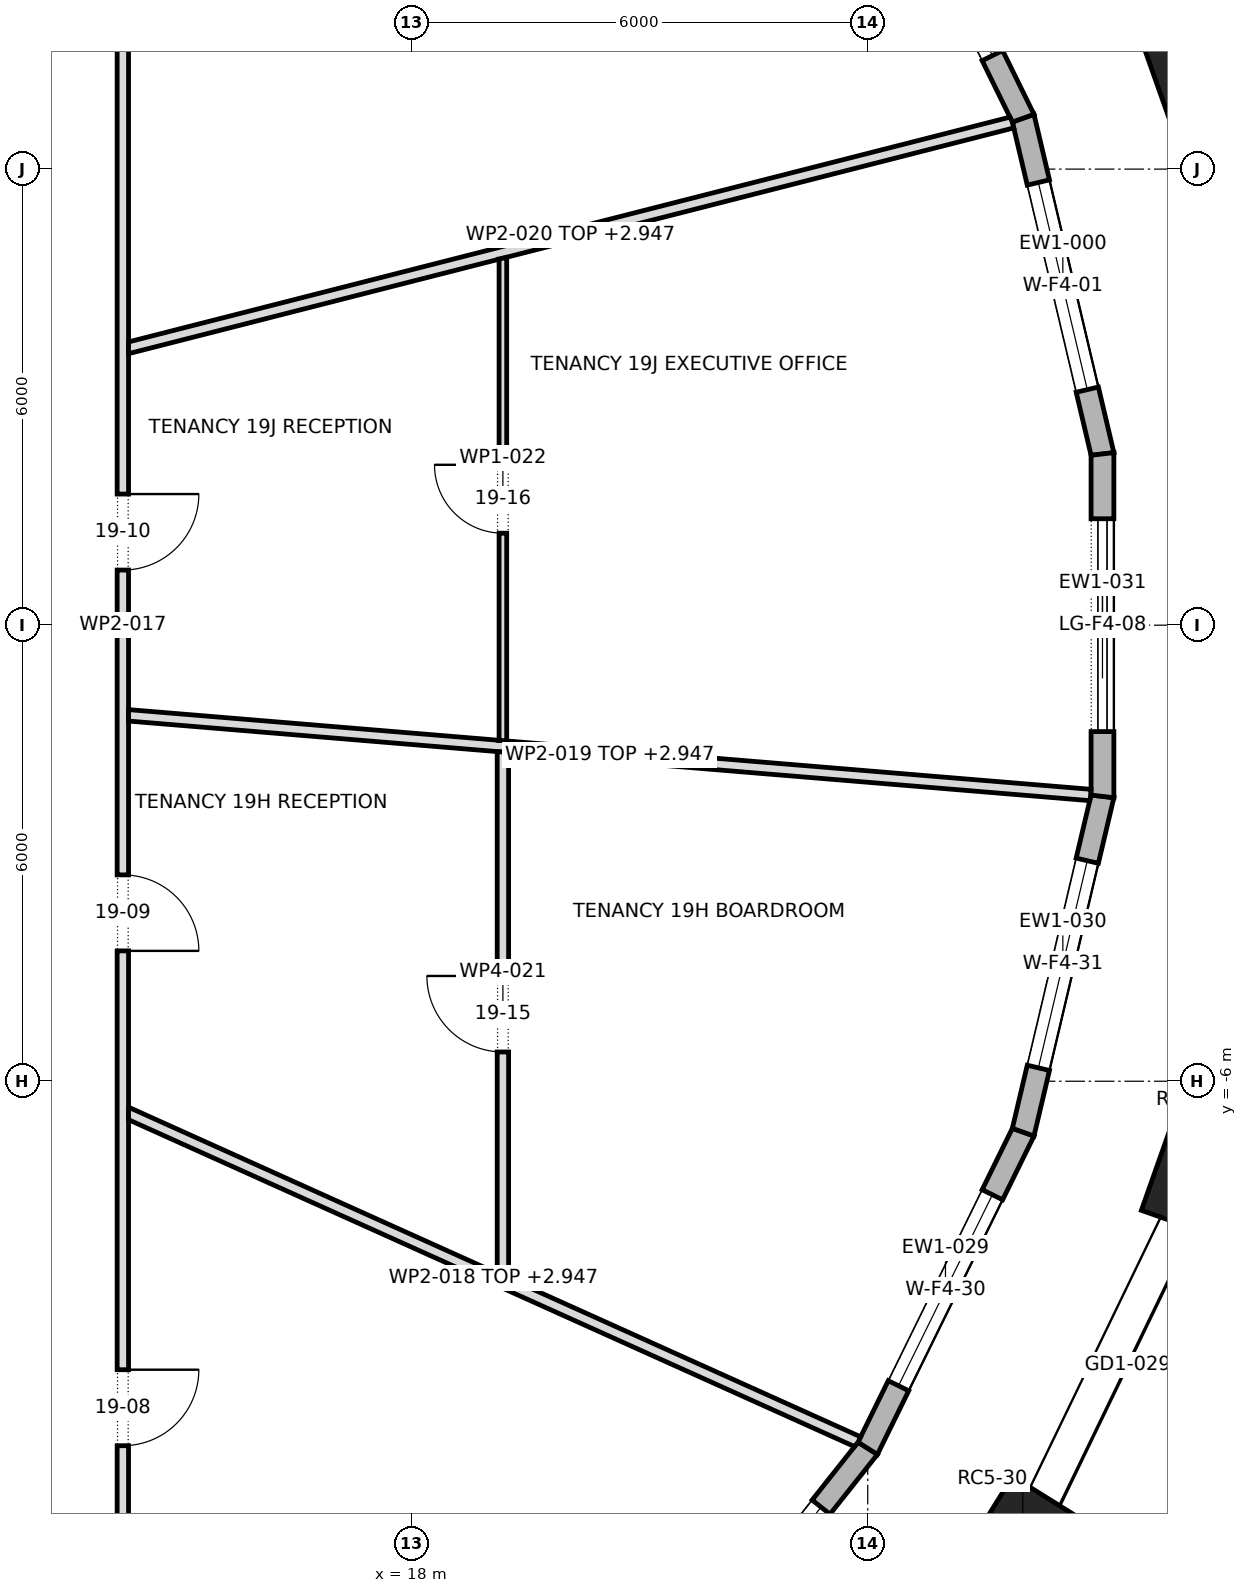
"""IFC4 building model, lengths in metres.
Left out: names, types, materials, properties, quantities, classifications, styles, units other than length and angle.
Written with IfcOpenShell. Run it as: python <this file> out.ifc"""

import sys

from ifc_helpers import new_model, si_unit, direction, frame, frame_2d, origin, origin_2d, place, context, subcontext, project, spatial, polyline, rectangle, outline, extrude, element, fill, save


model = new_model("IFC4")
c1 = context("Model", 3, precision=1e-05, world=origin(), true_north=direction((0.0, 1.0)))
c2 = subcontext(c1, "Body", "Model", "MODEL_VIEW")
j1 = project(units=[si_unit("LENGTHUNIT", "METRE"), si_unit("PLANEANGLEUNIT", "RADIAN")], contexts=[c1])
p1 = place(None, origin())
s1 = spatial("IfcSite", under=j1, at=p1, CompositionType="ELEMENT")
p2 = place(p1, origin())
s2 = spatial("IfcBuilding", under=s1, at=p2, CompositionType="ELEMENT")
p3 = place(p2, frame((0.0, 0.0, 276.3)))
s3 = spatial("IfcBuildingStorey", under=s2, at=p3, CompositionType="ELEMENT", Elevation=276.3)
for number, where, z_axis, x_axis in (
    (1, (28.255, 7.347, 0.0), (0.0, 0.0, 1.0), (-0.334, 0.943, 0.0)),
    (2, (26.04, -11.93, 0.0), (0.0, 0.0, 1.0), (0.529, 0.849, 0.0)),
    (3, (28.255, -7.347, 0.0), (0.0, 0.0, 1.0), (0.334, 0.943, 0.0)),
):
    element("IfcColumn", number, at=place(p3, frame(where, z_axis=z_axis, x_axis=x_axis)), inside=s3, PredefinedType="COLUMN", context=c2, shape_type="SweptSolid", body=[
        extrude(rectangle(XDim=1.1, YDim=1.0, at=origin_2d()), origin(), (0.0, 0.0, 1.0), 4.0),
    ])
p4 = place(p3, frame((27.088, 2.252, 0.0), z_axis=(0.0, 0.0, 1.0), x_axis=(-0.22983372436, 0.973229910734, 0.0)))
e4 = element("IfcWall", 4, at=p4, inside=s3, PredefinedType="STANDARD", context=c2, shape_type="SweptSolid", body=[
    extrude(outline(polyline([(-0.018, -0.15), (4.556, -0.15), (4.522, 0.15), (0.018, 0.15), (-0.018, -0.15)])), origin(), (0.0, 0.0, 1.0), 3.7),
])
p5 = place(p4, frame((0.869, 0.0, 0.6)))
e5 = element("IfcOpeningElement", 5, at=p5, cuts=e4, PredefinedType="OPENING", context=c2, shape_type="SweptSolid", body=[
    extrude(rectangle(XDim=2.8, YDim=2.65, at=frame_2d((1.4, 1.325))), frame((0.0, 0.162, 0.0), z_axis=(0.0, -1.0, 0.0), x_axis=(1.0, 0.0, 0.0)), (0.0, 0.0, 1.0), 0.324),
])
p6 = place(p3, frame((26.045, 6.67, 0.0), z_axis=(0.0, 0.0, 1.0), x_axis=(-0.441261940724, 0.897378348117, 0.0)))
e6 = element("IfcWall", 6, at=p6, inside=s3, PredefinedType="STANDARD", context=c2, shape_type="SweptSolid", body=[
    extrude(outline(polyline([(-0.017, -0.15), (4.651, -0.15), (4.619, 0.15), (0.017, 0.15), (-0.017, -0.15)])), origin(), (0.0, 0.0, 1.0), 3.7),
])
p7 = place(p6, frame((0.917, 0.0, 0.6)))
e7 = element("IfcOpeningElement", 7, at=p7, cuts=e6, PredefinedType="OPENING", context=c2, shape_type="SweptSolid", body=[
    extrude(rectangle(XDim=2.8, YDim=2.65, at=frame_2d((1.4, 1.325))), frame((0.0, 0.162, 0.0), z_axis=(0.0, -1.0, 0.0), x_axis=(1.0, 0.0, 0.0)), (0.0, 0.0, 1.0), 0.324),
])
p8 = place(p3, frame((21.032, -14.57, 0.0), z_axis=(0.0, 0.0, 1.0), x_axis=(0.621434755851, 0.783465917715, 0.0)))
e8 = element("IfcWall", 8, at=p8, inside=s3, PredefinedType="STANDARD", context=c2, shape_type="SweptSolid", body=[
    extrude(outline(polyline([(-0.015, -0.15), (4.791, -0.15), (4.759, 0.15), (0.015, 0.15), (-0.015, -0.15)])), origin(), (0.0, 0.0, 1.0), 3.7),
])
p9 = place(p8, frame((0.987, 0.0, 0.6)))
e9 = element("IfcOpeningElement", 9, at=p9, cuts=e8, PredefinedType="OPENING", context=c2, shape_type="SweptSolid", body=[
    extrude(rectangle(XDim=2.8, YDim=2.65, at=frame_2d((1.4, 1.325))), frame((0.0, 0.162, 0.0), z_axis=(0.0, -1.0, 0.0), x_axis=(1.0, 0.0, 0.0)), (0.0, 0.0, 1.0), 0.324),
])
p10 = place(p3, frame((24.0, -10.829, 0.0), z_axis=(0.0, 0.0, 1.0), x_axis=(0.441261940724, 0.897378348117, 0.0)))
e10 = element("IfcWall", 10, at=p10, inside=s3, PredefinedType="STANDARD", context=c2, shape_type="SweptSolid", body=[
    extrude(outline(polyline([(-0.016, -0.15), (4.652, -0.15), (4.618, 0.15), (0.016, 0.15), (-0.016, -0.15)])), origin(), (0.0, 0.0, 1.0), 3.7),
])
p11 = place(p10, frame((0.917, 0.0, 0.6)))
e11 = element("IfcOpeningElement", 11, at=p11, cuts=e10, PredefinedType="OPENING", context=c2, shape_type="SweptSolid", body=[
    extrude(rectangle(XDim=2.8, YDim=2.65, at=frame_2d((1.4, 1.325))), frame((0.0, 0.162, 0.0), z_axis=(0.0, -1.0, 0.0), x_axis=(1.0, 0.0, 0.0)), (0.0, 0.0, 1.0), 0.324),
])
p12 = place(p3, frame((26.045, -6.67, 0.0), z_axis=(0.0, 0.0, 1.0), x_axis=(0.22983372436, 0.973229910734, 0.0)))
e12 = element("IfcWall", 12, at=p12, inside=s3, PredefinedType="STANDARD", context=c2, shape_type="SweptSolid", body=[
    extrude(outline(polyline([(-0.017, -0.15), (4.557, -0.15), (4.521, 0.15), (0.017, 0.15), (-0.017, -0.15)])), origin(), (0.0, 0.0, 1.0), 3.7),
])
p13 = place(p12, frame((0.869, 0.0, 0.6)))
e13 = element("IfcOpeningElement", 13, at=p13, cuts=e12, PredefinedType="OPENING", context=c2, shape_type="SweptSolid", body=[
    extrude(rectangle(XDim=2.8, YDim=2.65, at=frame_2d((1.4, 1.325))), frame((0.0, 0.162, 0.0), z_axis=(0.0, -1.0, 0.0), x_axis=(1.0, 0.0, 0.0)), (0.0, 0.0, 1.0), 0.324),
])
p14 = place(p3, frame((27.088, -2.252, 0.0), z_axis=(0.0, 0.0, 1.0), x_axis=(0.0, 1.0, 0.0)))
e14 = element("IfcWall", 14, at=p14, inside=s3, PredefinedType="STANDARD", context=c2, shape_type="SweptSolid", body=[
    extrude(outline(polyline([(-0.018, -0.15), (4.522, -0.15), (4.487, 0.15), (0.018, 0.15), (-0.018, -0.15)])), origin(), (0.0, 0.0, 1.0), 3.7),
])
p15 = place(p14, frame((0.852, 0.0, 0.0)))
e15 = element("IfcOpeningElement", 15, at=p15, cuts=e14, PredefinedType="OPENING", context=c2, shape_type="SweptSolid", body=[
    extrude(rectangle(XDim=2.8, YDim=3.25, at=frame_2d((1.4, 1.625))), frame((0.0, 0.162, 0.0), z_axis=(0.0, -1.0, 0.0), x_axis=(1.0, 0.0, 0.0)), (0.0, 0.0, 1.0), 0.324),
])
p16 = place(p3, frame((14.2, -14.275, 0.0), z_axis=(0.0, 0.0, 1.0), x_axis=(0.0, 1.0, 0.0)))
e16 = element("IfcWall", 16, at=p16, inside=s3, PredefinedType="PARTITIONING", context=c2, shape_type="SweptSolid", body=[
    extrude(outline(polyline([(28.55, -0.075), (28.55, -0.075), (28.4, 0.075), (26.517, 0.075), (24.633, 0.075), (22.75, 0.075), (20.866, 0.075), (18.983, 0.075), (17.1, 0.075), (15.217, 0.075), (13.333, 0.075), (11.45, 0.075), (9.567, 0.075), (7.683, 0.075), (5.8, 0.075), (3.917, 0.075), (2.033, 0.075), (0.15, 0.075), (0.0, -0.075), (1.903, -0.075), (3.807, -0.075), (5.71, -0.075), (7.613, -0.075), (9.517, -0.075), (11.42, -0.075), (13.323, -0.075), (15.227, -0.075), (17.13, -0.075), (19.033, -0.075), (20.937, -0.075), (22.84, -0.075), (24.743, -0.075), (26.646, -0.075), (28.55, -0.075)])), origin(), (0.0, 0.0, 1.0), 3.7),
])
p17 = place(p16, frame((3.48, 0.0, 0.0)))
e17 = element("IfcOpeningElement", 17, at=p17, cuts=e16, PredefinedType="OPENING", context=c2, shape_type="SweptSolid", body=[
    extrude(rectangle(XDim=1.0, YDim=2.1, at=frame_2d((0.5, 1.05))), frame((0.0, 0.087, 0.0), z_axis=(0.0, -1.0, 0.0), x_axis=(1.0, 0.0, 0.0)), (0.0, 0.0, 1.0), 0.174),
])
p18 = place(p16, frame((9.99, 0.0, 0.0)))
e18 = element("IfcOpeningElement", 18, at=p18, cuts=e16, PredefinedType="OPENING", context=c2, shape_type="SweptSolid", body=[
    extrude(rectangle(XDim=1.0, YDim=2.1, at=frame_2d((0.5, 1.05))), frame((0.0, 0.087, 0.0), z_axis=(0.0, -1.0, 0.0), x_axis=(1.0, 0.0, 0.0)), (0.0, 0.0, 1.0), 0.174),
])
p19 = place(p16, frame((15.0, 0.0, 0.0)))
e19 = element("IfcOpeningElement", 19, at=p19, cuts=e16, PredefinedType="OPENING", context=c2, shape_type="SweptSolid", body=[
    extrude(rectangle(XDim=1.0, YDim=2.1, at=frame_2d((0.5, 1.05))), frame((0.0, 0.087, 0.0), z_axis=(0.0, -1.0, 0.0), x_axis=(1.0, 0.0, 0.0)), (0.0, 0.0, 1.0), 0.174),
])
p20 = place(p16, frame((22.69, 0.0, 0.0)))
e20 = element("IfcOpeningElement", 20, at=p20, cuts=e16, PredefinedType="OPENING", context=c2, shape_type="SweptSolid", body=[
    extrude(rectangle(XDim=1.0, YDim=2.1, at=frame_2d((0.5, 1.05))), frame((0.0, 0.087, 0.0), z_axis=(0.0, -1.0, 0.0), x_axis=(1.0, 0.0, 0.0)), (0.0, 0.0, 1.0), 0.174),
])
p21 = place(p3, frame((14.245, -6.41, 0.0), z_axis=(0.0, 0.0, 1.0), x_axis=(0.91183931518, -0.410547272908, 0.0)))
e21 = element("IfcWall", 21, at=p21, inside=s3, PredefinedType="PARTITIONING", context=c2, shape_type="SweptSolid", body=[
    extrude(outline(polyline([(0.067, -0.075), (1.813, -0.075), (3.559, -0.075), (5.304, -0.075), (7.05, -0.075), (8.796, -0.075), (10.542, -0.075), (10.56, -0.003), (10.562, 0.073), (10.562, 0.075), (8.816, 0.075), (7.07, 0.075), (5.324, 0.075), (5.319, 0.073), (5.318, 0.075), (3.546, 0.075), (1.773, 0.075), (0.0, 0.075), (0.0, 0.074), (0.067, -0.075)])), origin(), (0.0, 0.0, 1.0), 2.947),
])
p22 = place(p3, frame((14.269, -1.186, 0.0), z_axis=(0.0, 0.0, 1.0), x_axis=(0.996588692452, -0.082528650035, 0.0)))
e22 = element("IfcWall", 22, at=p22, inside=s3, PredefinedType="PARTITIONING", context=c2, shape_type="SweptSolid", body=[
    extrude(outline(polyline([(0.012, -0.075), (1.682, -0.075), (3.353, -0.075), (5.023, -0.075), (5.029, -0.074), (5.029, -0.075), (6.947, -0.075), (8.865, -0.075), (10.783, -0.075), (12.701, -0.075), (12.706, -0.042), (12.706, 0.075), (10.753, 0.075), (8.8, 0.075), (6.847, 0.075), (4.894, 0.075), (4.891, 0.075), (4.891, 0.075), (3.261, 0.075), (1.63, 0.075), (0.0, 0.075), (0.0, 0.069), (0.012, -0.075)])), origin(), (0.0, 0.0, 1.0), 2.947),
])
p23 = place(p3, frame((14.257, 3.645, 0.0), z_axis=(0.0, 0.0, 1.0), x_axis=(0.968990601513, 0.247097580277, 0.0)))
e23 = element("IfcWall", 23, at=p23, inside=s3, PredefinedType="PARTITIONING", context=c2, shape_type="SweptSolid", body=[
    extrude(outline(polyline([(12.019, -0.075), (12.019, 0.011), (12.005, 0.075), (10.011, 0.075), (8.016, 0.075), (6.022, 0.075), (4.027, 0.075), (2.033, 0.075), (0.038, 0.075), (0.0, -0.074), (0.0, -0.075), (1.717, -0.075), (3.434, -0.075), (5.151, -0.075), (6.868, -0.075), (8.585, -0.075), (10.302, -0.075), (12.019, -0.075)])), origin(), (0.0, 0.0, 1.0), 2.947),
])
p24 = place(p3, frame((19.2, -1.664, 0.0), z_axis=(0.0, 0.0, 1.0), x_axis=(0.0, -1.0, 0.0)))
e24 = element("IfcWall", 24, at=p24, inside=s3, PredefinedType="PARTITIONING", context=c2, shape_type="SweptSolid", body=[
    extrude(outline(polyline([(0.0, -0.075), (1.715, -0.075), (3.431, -0.075), (5.146, -0.075), (6.862, -0.075), (6.929, 0.074), (6.929, 0.075), (5.2, 0.075), (3.47, 0.075), (1.741, 0.075), (0.012, 0.075), (0.0, -0.07), (0.0, -0.075)])), origin(), (0.0, 0.0, 1.0), 3.7),
])
p25 = place(p24, frame((2.951, 0.0, 0.0)))
e25 = element("IfcOpeningElement", 25, at=p25, cuts=e24, PredefinedType="OPENING", context=c2, shape_type="SweptSolid", body=[
    extrude(rectangle(XDim=1.0, YDim=2.1, at=frame_2d((0.5, 1.05))), frame((0.0, 0.087, 0.0), z_axis=(0.0, -1.0, 0.0), x_axis=(1.0, 0.0, 0.0)), (0.0, 0.0, 1.0), 0.174),
])
p26 = place(p3, frame((19.2, 4.84, 0.0), z_axis=(0.0, 0.0, 1.0), x_axis=(0.0, -1.0, 0.0)))
e26 = element("IfcWall", 26, at=p26, inside=s3, PredefinedType="PARTITIONING", context=c2, shape_type="SweptSolid", body=[
    extrude(outline(polyline([(0.025, -0.05), (1.607, -0.05), (3.19, -0.05), (4.772, -0.05), (6.355, -0.05), (6.363, 0.045), (6.363, 0.05), (4.772, 0.05), (3.181, 0.05), (1.591, 0.05), (0.0, 0.05), (0.0, 0.049), (0.025, -0.05)])), origin(), (0.0, 0.0, 1.0), 3.7),
])
p27 = place(p26, frame((2.73, 0.0, 0.0)))
e27 = element("IfcOpeningElement", 27, at=p27, cuts=e26, PredefinedType="OPENING", context=c2, shape_type="SweptSolid", body=[
    extrude(rectangle(XDim=0.9, YDim=2.1, at=frame_2d((0.45, 1.05))), frame((0.0, 0.062, 0.0), z_axis=(0.0, -1.0, 0.0), x_axis=(1.0, 0.0, 0.0)), (0.0, 0.0, 1.0), 0.124),
])
p28 = place(p5, origin())
e28 = element("IfcWindow", 28, at=p28, inside=s3, PartitioningType="DOUBLE_PANEL_VERTICAL", PredefinedType="WINDOW", context=c2, shape_type="SweptSolid", body=[
    extrude(rectangle(XDim=2.8, YDim=2.65, at=frame_2d((1.4, 1.325))), frame((0.0, 0.03, 0.0), z_axis=(0.0, -1.0, 0.0), x_axis=(1.0, 0.0, 0.0)), (0.0, 0.0, 1.0), 0.06),
])
fill(e5, e28)
p29 = place(p7, origin())
e29 = element("IfcWindow", 29, at=p29, inside=s3, PartitioningType="DOUBLE_PANEL_VERTICAL", PredefinedType="WINDOW", context=c2, shape_type="SweptSolid", body=[
    extrude(rectangle(XDim=2.8, YDim=2.65, at=frame_2d((1.4, 1.325))), frame((0.0, 0.03, 0.0), z_axis=(0.0, -1.0, 0.0), x_axis=(1.0, 0.0, 0.0)), (0.0, 0.0, 1.0), 0.06),
])
fill(e7, e29)
p30 = place(p9, origin())
e30 = element("IfcWindow", 30, at=p30, inside=s3, PartitioningType="DOUBLE_PANEL_VERTICAL", PredefinedType="WINDOW", context=c2, shape_type="SweptSolid", body=[
    extrude(rectangle(XDim=2.8, YDim=2.65, at=frame_2d((1.4, 1.325))), frame((0.0, 0.03, 0.0), z_axis=(0.0, -1.0, 0.0), x_axis=(1.0, 0.0, 0.0)), (0.0, 0.0, 1.0), 0.06),
])
fill(e9, e30)
p31 = place(p11, origin())
e31 = element("IfcWindow", 31, at=p31, inside=s3, PartitioningType="DOUBLE_PANEL_VERTICAL", PredefinedType="WINDOW", context=c2, shape_type="SweptSolid", body=[
    extrude(rectangle(XDim=2.8, YDim=2.65, at=frame_2d((1.4, 1.325))), frame((0.0, 0.03, 0.0), z_axis=(0.0, -1.0, 0.0), x_axis=(1.0, 0.0, 0.0)), (0.0, 0.0, 1.0), 0.06),
])
fill(e11, e31)
p32 = place(p13, origin())
e32 = element("IfcWindow", 32, at=p32, inside=s3, PartitioningType="DOUBLE_PANEL_VERTICAL", PredefinedType="WINDOW", context=c2, shape_type="SweptSolid", body=[
    extrude(rectangle(XDim=2.8, YDim=2.65, at=frame_2d((1.4, 1.325))), frame((0.0, 0.03, 0.0), z_axis=(0.0, -1.0, 0.0), x_axis=(1.0, 0.0, 0.0)), (0.0, 0.0, 1.0), 0.06),
])
fill(e13, e32)
p33 = place(p15, origin())
e33 = element("IfcDoor", 33, at=p33, inside=s3, OperationType="DOUBLE_DOOR_SLIDING", PredefinedType="DOOR", context=c2, shape_type="SweptSolid", body=[
    extrude(rectangle(XDim=2.8, YDim=3.25, at=frame_2d((1.4, 1.625))), frame((0.0, 0.025, 0.0), z_axis=(0.0, -1.0, 0.0), x_axis=(1.0, 0.0, 0.0)), (0.0, 0.0, 1.0), 0.05),
])
fill(e15, e33)
p34 = place(p17, frame((1.0, 0.0, 0.0), z_axis=(0.0, 0.0, 1.0), x_axis=(-1.0, 0.0, 0.0)))
e34 = element("IfcDoor", 34, at=p34, inside=s3, OperationType="SINGLE_SWING_RIGHT", PredefinedType="DOOR", context=c2, shape_type="SweptSolid", body=[
    extrude(rectangle(XDim=1.0, YDim=2.1, at=frame_2d((0.5, 1.05))), frame((0.0, 0.025, 0.0), z_axis=(0.0, -1.0, 0.0), x_axis=(1.0, 0.0, 0.0)), (0.0, 0.0, 1.0), 0.05),
])
fill(e17, e34)
p35 = place(p18, frame((1.0, 0.0, 0.0), z_axis=(0.0, 0.0, 1.0), x_axis=(-1.0, 0.0, 0.0)))
e35 = element("IfcDoor", 35, at=p35, inside=s3, OperationType="SINGLE_SWING_LEFT", PredefinedType="DOOR", context=c2, shape_type="SweptSolid", body=[
    extrude(rectangle(XDim=1.0, YDim=2.1, at=frame_2d((0.5, 1.05))), frame((0.0, 0.025, 0.0), z_axis=(0.0, -1.0, 0.0), x_axis=(1.0, 0.0, 0.0)), (0.0, 0.0, 1.0), 0.05),
])
fill(e18, e35)
p36 = place(p19, frame((1.0, 0.0, 0.0), z_axis=(0.0, 0.0, 1.0), x_axis=(-1.0, 0.0, 0.0)))
e36 = element("IfcDoor", 36, at=p36, inside=s3, OperationType="SINGLE_SWING_RIGHT", PredefinedType="DOOR", context=c2, shape_type="SweptSolid", body=[
    extrude(rectangle(XDim=1.0, YDim=2.1, at=frame_2d((0.5, 1.05))), frame((0.0, 0.025, 0.0), z_axis=(0.0, -1.0, 0.0), x_axis=(1.0, 0.0, 0.0)), (0.0, 0.0, 1.0), 0.05),
])
fill(e19, e36)
p37 = place(p25, frame((1.0, 0.0, 0.0), z_axis=(0.0, 0.0, 1.0), x_axis=(-1.0, 0.0, 0.0)))
e37 = element("IfcDoor", 37, at=p37, inside=s3, OperationType="SINGLE_SWING_LEFT", PredefinedType="DOOR", context=c2, shape_type="SweptSolid", body=[
    extrude(rectangle(XDim=1.0, YDim=2.1, at=frame_2d((0.5, 1.05))), frame((0.0, 0.025, 0.0), z_axis=(0.0, -1.0, 0.0), x_axis=(1.0, 0.0, 0.0)), (0.0, 0.0, 1.0), 0.05),
])
fill(e25, e37)
p38 = place(p27, frame((0.9, 0.0, 0.0), z_axis=(0.0, 0.0, 1.0), x_axis=(-1.0, 0.0, 0.0)))
e38 = element("IfcDoor", 38, at=p38, inside=s3, OperationType="SINGLE_SWING_LEFT", PredefinedType="DOOR", context=c2, shape_type="SweptSolid", body=[
    extrude(rectangle(XDim=0.9, YDim=2.1, at=frame_2d((0.45, 1.05))), frame((0.0, 0.025, 0.0), z_axis=(0.0, -1.0, 0.0), x_axis=(1.0, 0.0, 0.0)), (0.0, 0.0, 1.0), 0.05),
])
fill(e27, e38)
save(model, sys.argv[1])
